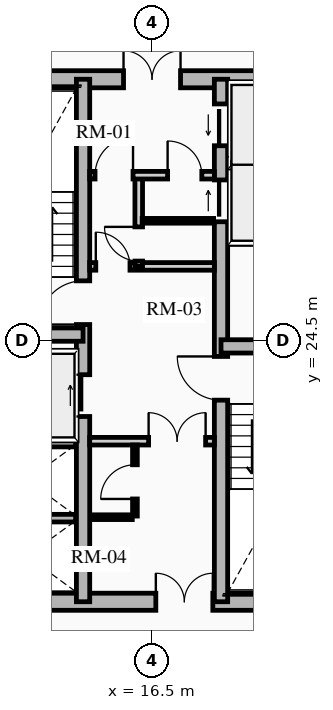
"""IFC4 building model, lengths in metres.
Left out: names, types, materials, properties, quantities, classifications, styles, units other than length and angle.
Written with IfcOpenShell. Run it as: python <this file> out.ifc"""

import sys

from ifc_helpers import new_model, si_unit, direction, frame, frame_2d, origin, place, context, subcontext, project, spatial, rectangle, extrude, source, transform, mapped, element, fill, save


model = new_model("IFC4")
c1 = context("Model", 3, precision=1e-05, world=origin(), true_north=direction((0.0, 1.0)))
c2 = subcontext(c1, "Body", "Model", "MODEL_VIEW")
j1 = project(units=[si_unit("LENGTHUNIT", "METRE"), si_unit("PLANEANGLEUNIT", "RADIAN")], contexts=[c1])
p1 = place(None, origin())
s1 = spatial("IfcSite", under=j1, at=p1, CompositionType="ELEMENT")
p2 = place(p1, origin())
s2 = spatial("IfcBuilding", under=s1, at=p2, CompositionType="ELEMENT")
p3 = place(p2, frame((0.0, 0.0, 93.43)))
s3 = spatial("IfcBuildingStorey", under=s2, at=p3, CompositionType="ELEMENT", Elevation=93.43)
p4 = place(p3, frame((11.15, 17.625, 0.0), z_axis=(0.0, 0.0, 1.0), x_axis=(1.0, 0.0, 0.0)))
e1 = element("IfcWall", 1, at=p4, inside=s3, PredefinedType="SHEAR", context=c2, shape_type="SweptSolid", body=[
    extrude(rectangle(XDim=10.7, YDim=0.45, at=frame_2d((5.35, 0.0))), origin(), (0.0, 0.0, 1.0), 2.91),
])
m1 = source(origin(), c2, "Body", "SweptSolid", [
    extrude(rectangle(XDim=1.5, YDim=2.02, at=frame_2d((0.75, 1.01))), frame((0.0, 0.235, 0.0), z_axis=(0.0, -1.0, 0.0), x_axis=(1.0, 0.0, 0.0)), (0.0, 0.0, 1.0), 0.47),
])
p5 = place(p4, frame((5.45, 0.0, 0.0)))
e2 = element("IfcOpeningElement", 2, at=p5, cuts=e1, PredefinedType="OPENING", context=c2, shape_type="MappedRepresentation", body=[
    mapped(m1, transform((0.0, 0.0, 0.0), x_axis=(1.0, 0.0, 0.0), y_axis=(0.0, 1.0, 0.0), z_axis=(0.0, 0.0, 1.0), scale=1.0)),
])
p6 = place(p3, frame((11.15, 31.375, 0.0), z_axis=(0.0, 0.0, 1.0), x_axis=(1.0, 0.0, 0.0)))
e3 = element("IfcWall", 3, at=p6, inside=s3, PredefinedType="SHEAR", context=c2, shape_type="SweptSolid", body=[
    extrude(rectangle(XDim=10.7, YDim=0.45, at=frame_2d((5.35, 0.0))), origin(), (0.0, 0.0, 1.0), 2.91),
])
p7 = place(p6, frame((4.6, 0.0, 0.0)))
e4 = element("IfcOpeningElement", 4, at=p7, cuts=e3, PredefinedType="OPENING", context=c2, shape_type="MappedRepresentation", body=[
    mapped(m1, transform((0.0, 0.0, 0.0), x_axis=(1.0, 0.0, 0.0), y_axis=(0.0, 1.0, 0.0), z_axis=(0.0, 0.0, 1.0), scale=1.0)),
])
p8 = place(p3, frame((14.685, 17.625, 0.0), z_axis=(0.0, 0.0, 1.0), x_axis=(0.0, 1.0, 0.0)))
e5 = element("IfcWall", 5, at=p8, inside=s3, PredefinedType="SHEAR", context=c2, shape_type="SweptSolid", body=[
    extrude(rectangle(XDim=13.75, YDim=0.35, at=frame_2d((6.875, 0.0))), origin(), (0.0, 0.0, 1.0), 2.91),
])
m2 = source(origin(), c2, "Body", "SweptSolid", [
    extrude(rectangle(XDim=1.1, YDim=2.015, at=frame_2d((0.55, 1.007))), frame((0.0, 0.185, 0.0), z_axis=(0.0, -1.0, 0.0), x_axis=(1.0, 0.0, 0.0)), (0.0, 0.0, 1.0), 0.37),
])
p9 = place(p8, frame((4.875, 0.0, 0.0)))
e6 = element("IfcOpeningElement", 6, at=p9, cuts=e5, PredefinedType="OPENING", context=c2, shape_type="MappedRepresentation", body=[
    mapped(m2, transform((0.0, 0.0, 0.0), x_axis=(1.0, 0.0, 0.0), y_axis=(0.0, 1.0, 0.0), z_axis=(0.0, 0.0, 1.0), scale=1.0)),
])
m3 = source(origin(), c2, "Body", "SweptSolid", [
    extrude(rectangle(XDim=1.15, YDim=2.02, at=frame_2d((0.575, 1.01))), frame((0.0, 0.185, 0.0), z_axis=(0.0, -1.0, 0.0), x_axis=(1.0, 0.0, 0.0)), (0.0, 0.0, 1.0), 0.37),
])
p10 = place(p8, frame((7.295, 0.0, 0.0)))
e7 = element("IfcOpeningElement", 7, at=p10, cuts=e5, PredefinedType="OPENING", context=c2, shape_type="MappedRepresentation", body=[
    mapped(m3, transform((0.0, 0.0, 0.0), x_axis=(1.0, 0.0, 0.0), y_axis=(0.0, 1.0, 0.0), z_axis=(0.0, 0.0, 1.0), scale=1.0)),
])
p11 = place(p3, frame((18.315, 17.625, 0.0), z_axis=(0.0, 0.0, 1.0), x_axis=(0.0, 1.0, 0.0)))
e8 = element("IfcWall", 8, at=p11, inside=s3, PredefinedType="SHEAR", context=c2, shape_type="SweptSolid", body=[
    extrude(rectangle(XDim=13.75, YDim=0.35, at=frame_2d((6.875, 0.0))), origin(), (0.0, 0.0, 1.0), 2.91),
])
p12 = place(p11, frame((10.0, 0.0, 0.0)))
e9 = element("IfcOpeningElement", 9, at=p12, cuts=e8, PredefinedType="OPENING", context=c2, shape_type="MappedRepresentation", body=[
    mapped(m2, transform((0.0, 0.0, 0.0), x_axis=(1.0, 0.0, 0.0), y_axis=(0.0, 1.0, 0.0), z_axis=(0.0, 0.0, 1.0), scale=1.0)),
])
p13 = place(p11, frame((12.0, 0.0, 0.0)))
e10 = element("IfcOpeningElement", 10, at=p13, cuts=e8, PredefinedType="OPENING", context=c2, shape_type="MappedRepresentation", body=[
    mapped(m2, transform((0.0, 0.0, 0.0), x_axis=(1.0, 0.0, 0.0), y_axis=(0.0, 1.0, 0.0), z_axis=(0.0, 0.0, 1.0), scale=1.0)),
])
p14 = place(p11, frame((5.305, 0.0, 0.0)))
e11 = element("IfcOpeningElement", 11, at=p14, cuts=e8, PredefinedType="OPENING", context=c2, shape_type="MappedRepresentation", body=[
    mapped(m3, transform((0.0, 0.0, 0.0), x_axis=(1.0, 0.0, 0.0), y_axis=(0.0, 1.0, 0.0), z_axis=(0.0, 0.0, 1.0), scale=1.0)),
])
for number, where, z_axis, x_axis in (
    (12, (11.4, 24.655, 0.0), (0.0, 0.0, 1.0), (1.0, 0.0, 0.0)),
    (13, (18.315, 24.345, 0.0), (0.0, 0.0, 1.0), (1.0, 0.0, 0.0)),
):
    element("IfcWall", number, at=place(p3, frame(where, z_axis=z_axis, x_axis=x_axis)), inside=s3, PredefinedType="SHEAR", context=c2, shape_type="SweptSolid", body=[
        extrude(rectangle(XDim=3.285, YDim=0.35, at=frame_2d((1.643, 0.0))), origin(), (0.0, 0.0, 1.0), 2.91),
    ])
for number, where, z_axis, x_axis in (
    (14, (11.52, 21.8, 0.0), (0.0, 0.0, 1.0), (1.0, 0.0, 0.0)),
    (15, (11.52, 19.825, 0.0), (0.0, 0.0, 1.0), (1.0, 0.0, 0.0)),
    (16, (18.51, 27.13, 0.0), (0.0, 0.0, 1.0), (1.0, 0.0, 0.0)),
    (17, (18.51, 29.175, 0.0), (0.0, 0.0, 1.0), (1.0, 0.0, 0.0)),
):
    element("IfcWall", number, at=place(p3, frame(where, z_axis=z_axis, x_axis=x_axis)), inside=s3, PredefinedType="SHEAR", context=c2, shape_type="SweptSolid", body=[
        extrude(rectangle(XDim=2.97, YDim=0.2, at=frame_2d((1.485, 0.0))), origin(), (0.0, 0.0, 1.0), 2.91),
    ])
p15 = place(p3, frame((14.86, 21.85, 0.0), z_axis=(0.0, 0.0, 1.0), x_axis=(1.0, 0.0, 0.0)))
e18 = element("IfcWall", 18, at=p15, inside=s3, PredefinedType="PARTITIONING", context=c2, shape_type="SweptSolid", body=[
    extrude(rectangle(XDim=3.28, YDim=0.2, at=frame_2d((1.64, 0.0))), origin(), (0.0, 0.0, 1.0), 2.655),
])
m4 = source(origin(), c2, "Body", "SweptSolid", [
    extrude(rectangle(XDim=1.5, YDim=2.02, at=frame_2d((0.75, 1.01))), frame((0.0, 0.11, 0.0), z_axis=(0.0, -1.0, 0.0), x_axis=(1.0, 0.0, 0.0)), (0.0, 0.0, 1.0), 0.22),
])
p16 = place(p15, frame((1.55, 0.0, 0.0)))
e19 = element("IfcOpeningElement", 19, at=p16, cuts=e18, PredefinedType="OPENING", context=c2, shape_type="MappedRepresentation", body=[
    mapped(m4, transform((0.0, 0.0, 0.0), x_axis=(1.0, 0.0, 0.0), y_axis=(0.0, 1.0, 0.0), z_axis=(0.0, 0.0, 1.0), scale=1.0)),
])
p17 = place(p3, frame((14.86, 26.45, 0.0), z_axis=(0.0, 0.0, 1.0), x_axis=(1.0, 0.0, 0.0)))
e20 = element("IfcWall", 20, at=p17, inside=s3, PredefinedType="PARTITIONING", context=c2, shape_type="SweptSolid", body=[
    extrude(rectangle(XDim=3.28, YDim=0.2, at=frame_2d((1.64, 0.0))), origin(), (0.0, 0.0, 1.0), 2.655),
])
m5 = source(origin(), c2, "Body", "SweptSolid", [
    extrude(rectangle(XDim=0.9, YDim=2.005, at=frame_2d((0.45, 1.002))), frame((0.0, 0.11, 0.0), z_axis=(0.0, -1.0, 0.0), x_axis=(1.0, 0.0, 0.0)), (0.0, 0.0, 1.0), 0.22),
])
p18 = place(p17, frame((0.16, 0.0, 0.0)))
e21 = element("IfcOpeningElement", 21, at=p18, cuts=e20, PredefinedType="OPENING", context=c2, shape_type="MappedRepresentation", body=[
    mapped(m5, transform((0.0, 0.0, 0.0), x_axis=(1.0, 0.0, 0.0), y_axis=(0.0, 1.0, 0.0), z_axis=(0.0, 0.0, 1.0), scale=1.0)),
])
p19 = place(p3, frame((16.15, 26.45, 0.0), z_axis=(0.0, 0.0, 1.0), x_axis=(0.0, 1.0, 0.0)))
e22 = element("IfcWall", 22, at=p19, inside=s3, PredefinedType="PARTITIONING", context=c2, shape_type="SweptSolid", body=[
    extrude(rectangle(XDim=2.4, YDim=0.2, at=frame_2d((1.2, 0.0))), origin(), (0.0, 0.0, 1.0), 2.655),
])
p20 = place(p19, frame((0.14, 0.0, 0.0)))
e23 = element("IfcOpeningElement", 23, at=p20, cuts=e22, PredefinedType="OPENING", context=c2, shape_type="MappedRepresentation", body=[
    mapped(m5, transform((0.0, 0.0, 0.0), x_axis=(1.0, 0.0, 0.0), y_axis=(0.0, 1.0, 0.0), z_axis=(0.0, 0.0, 1.0), scale=1.0)),
])
p21 = place(p3, frame((14.86, 28.85, 0.0), z_axis=(0.0, 0.0, 1.0), x_axis=(1.0, 0.0, 0.0)))
e24 = element("IfcWall", 24, at=p21, inside=s3, PredefinedType="PARTITIONING", context=c2, shape_type="SweptSolid", body=[
    extrude(rectangle(XDim=3.28, YDim=0.2, at=frame_2d((1.64, 0.0))), origin(), (0.0, 0.0, 1.0), 2.655),
])
m6 = source(origin(), c2, "Body", "SweptSolid", [
    extrude(rectangle(XDim=1.0, YDim=2.015, at=frame_2d((0.5, 1.007))), frame((0.0, 0.11, 0.0), z_axis=(0.0, -1.0, 0.0), x_axis=(1.0, 0.0, 0.0)), (0.0, 0.0, 1.0), 0.22),
])
p22 = place(p21, frame((0.14, 0.0, 0.0)))
e25 = element("IfcOpeningElement", 25, at=p22, cuts=e24, PredefinedType="OPENING", context=c2, shape_type="MappedRepresentation", body=[
    mapped(m6, transform((0.0, 0.0, 0.0), x_axis=(1.0, 0.0, 0.0), y_axis=(0.0, 1.0, 0.0), z_axis=(0.0, 0.0, 1.0), scale=1.0)),
])
p23 = place(p21, frame((2.05, 0.0, 0.0)))
e26 = element("IfcOpeningElement", 26, at=p23, cuts=e24, PredefinedType="OPENING", context=c2, shape_type="MappedRepresentation", body=[
    mapped(m5, transform((0.0, 0.0, 0.0), x_axis=(1.0, 0.0, 0.0), y_axis=(0.0, 1.0, 0.0), z_axis=(0.0, 0.0, 1.0), scale=1.0)),
])
p24 = place(p3, frame((16.05, 19.88, 0.0), z_axis=(0.0, 0.0, 1.0), x_axis=(0.0, 1.0, 0.0)))
e27 = element("IfcWall", 27, at=p24, inside=s3, PredefinedType="PARTITIONING", context=c2, shape_type="SweptSolid", body=[
    extrude(rectangle(XDim=1.87, YDim=0.125, at=frame_2d((0.935, 0.0))), origin(), (0.0, 0.0, 1.0), 2.655),
])
m7 = source(origin(), c2, "Body", "SweptSolid", [
    extrude(rectangle(XDim=0.9, YDim=2.005, at=frame_2d((0.45, 1.002))), frame((0.0, 0.073, 0.0), z_axis=(0.0, -1.0, 0.0), x_axis=(1.0, 0.0, 0.0)), (0.0, 0.0, 1.0), 0.145),
])
p25 = place(p24, frame((0.45, 0.0, 0.0)))
e28 = element("IfcOpeningElement", 28, at=p25, cuts=e27, PredefinedType="OPENING", context=c2, shape_type="MappedRepresentation", body=[
    mapped(m7, transform((0.0, 0.0, 0.0), x_axis=(1.0, 0.0, 0.0), y_axis=(0.0, 1.0, 0.0), z_axis=(0.0, 0.0, 1.0), scale=1.0)),
])
p26 = place(p3, frame((14.88, 19.85, 0.0), z_axis=(0.0, 0.0, 1.0), x_axis=(1.0, 0.0, 0.0)))
e29 = element("IfcWall", 29, at=p26, inside=s3, PredefinedType="PARTITIONING", context=c2, shape_type="SweptSolid", body=[
    extrude(rectangle(XDim=1.1, YDim=0.125, at=frame_2d((0.55, 0.0))), origin(), (0.0, 0.0, 1.0), 2.655),
])
p27 = place(p3, frame((16.24, 27.65, 0.0), z_axis=(0.0, 0.0, 1.0), x_axis=(1.0, 0.0, 0.0)))
e30 = element("IfcWall", 30, at=p27, inside=s3, PredefinedType="PARTITIONING", context=c2, shape_type="SweptSolid", body=[
    extrude(rectangle(XDim=1.88, YDim=0.125, at=frame_2d((0.94, 0.0))), origin(), (0.0, 0.0, 1.0), 2.655),
])
m8 = source(origin(), c2, "Body", "SweptSolid", [
    extrude(rectangle(XDim=1.1, YDim=2.015, at=frame_2d((0.55, 1.007))), frame((0.0, 0.025, 0.0), z_axis=(0.0, -1.0, 0.0), x_axis=(1.0, 0.0, 0.0)), (0.0, 0.0, 1.0), 0.05),
])
p28 = place(p9, origin())
e31 = element("IfcDoor", 31, at=p28, inside=s3, OperationType="SLIDING_TO_RIGHT", PredefinedType="DOOR", context=c2, shape_type="MappedRepresentation", body=[
    mapped(m8, transform((0.0, 0.0, 0.0), x_axis=(1.0, 0.0, 0.0), y_axis=(0.0, 1.0, 0.0), z_axis=(0.0, 0.0, 1.0), scale=1.0)),
])
fill(e6, e31)
p29 = place(p12, origin())
e32 = element("IfcDoor", 32, at=p29, inside=s3, OperationType="SLIDING_TO_RIGHT", PredefinedType="DOOR", context=c2, shape_type="MappedRepresentation", body=[
    mapped(m8, transform((0.0, 0.0, 0.0), x_axis=(1.0, 0.0, 0.0), y_axis=(0.0, 1.0, 0.0), z_axis=(0.0, 0.0, 1.0), scale=1.0)),
])
fill(e9, e32)
p30 = place(p13, origin())
e33 = element("IfcDoor", 33, at=p30, inside=s3, OperationType="SLIDING_TO_LEFT", PredefinedType="DOOR", context=c2, shape_type="MappedRepresentation", body=[
    mapped(m8, transform((0.0, 0.0, 0.0), x_axis=(1.0, 0.0, 0.0), y_axis=(0.0, 1.0, 0.0), z_axis=(0.0, 0.0, 1.0), scale=1.0)),
])
fill(e10, e33)
m9 = source(origin(), c2, "Body", "SweptSolid", [
    extrude(rectangle(XDim=1.15, YDim=2.02, at=frame_2d((0.575, 1.01))), frame((0.0, 0.025, 0.0), z_axis=(0.0, -1.0, 0.0), x_axis=(1.0, 0.0, 0.0)), (0.0, 0.0, 1.0), 0.05),
])
p31 = place(p10, origin())
e34 = element("IfcDoor", 34, at=p31, inside=s3, OperationType="SINGLE_SWING_LEFT", PredefinedType="DOOR", context=c2, shape_type="MappedRepresentation", body=[
    mapped(m9, transform((0.0, 0.0, 0.0), x_axis=(1.0, 0.0, 0.0), y_axis=(0.0, 1.0, 0.0), z_axis=(0.0, 0.0, 1.0), scale=1.0)),
])
fill(e7, e34)
p32 = place(p14, origin())
e35 = element("IfcDoor", 35, at=p32, inside=s3, OperationType="SINGLE_SWING_RIGHT", PredefinedType="DOOR", context=c2, shape_type="MappedRepresentation", body=[
    mapped(m9, transform((0.0, 0.0, 0.0), x_axis=(1.0, 0.0, 0.0), y_axis=(0.0, 1.0, 0.0), z_axis=(0.0, 0.0, 1.0), scale=1.0)),
])
fill(e11, e35)
m10 = source(origin(), c2, "Body", "SweptSolid", [
    extrude(rectangle(XDim=1.5, YDim=2.02, at=frame_2d((0.75, 1.01))), frame((0.0, 0.025, 0.0), z_axis=(0.0, -1.0, 0.0), x_axis=(1.0, 0.0, 0.0)), (0.0, 0.0, 1.0), 0.05),
])
p33 = place(p7, origin())
e36 = element("IfcDoor", 36, at=p33, inside=s3, OperationType="DOUBLE_DOOR_SINGLE_SWING", PredefinedType="DOOR", context=c2, shape_type="MappedRepresentation", body=[
    mapped(m10, transform((0.0, 0.0, 0.0), x_axis=(1.0, 0.0, 0.0), y_axis=(0.0, 1.0, 0.0), z_axis=(0.0, 0.0, 1.0), scale=1.0)),
])
fill(e4, e36)
p34 = place(p5, origin())
e37 = element("IfcDoor", 37, at=p34, inside=s3, OperationType="DOUBLE_DOOR_SINGLE_SWING", PredefinedType="DOOR", context=c2, shape_type="MappedRepresentation", body=[
    mapped(m10, transform((0.0, 0.0, 0.0), x_axis=(1.0, 0.0, 0.0), y_axis=(0.0, 1.0, 0.0), z_axis=(0.0, 0.0, 1.0), scale=1.0)),
])
fill(e2, e37)
p35 = place(p16, origin())
e38 = element("IfcDoor", 38, at=p35, inside=s3, OperationType="DOUBLE_DOOR_SINGLE_SWING", PredefinedType="DOOR", context=c2, shape_type="MappedRepresentation", body=[
    mapped(m10, transform((0.0, 0.0, 0.0), x_axis=(1.0, 0.0, 0.0), y_axis=(0.0, 1.0, 0.0), z_axis=(0.0, 0.0, 1.0), scale=1.0)),
])
fill(e19, e38)
m11 = source(origin(), c2, "Body", "SweptSolid", [
    extrude(rectangle(XDim=0.9, YDim=2.005, at=frame_2d((0.45, 1.002))), frame((0.0, 0.025, 0.0), z_axis=(0.0, -1.0, 0.0), x_axis=(1.0, 0.0, 0.0)), (0.0, 0.0, 1.0), 0.05),
])
p36 = place(p18, origin())
e39 = element("IfcDoor", 39, at=p36, inside=s3, OperationType="SINGLE_SWING_LEFT", PredefinedType="DOOR", context=c2, shape_type="MappedRepresentation", body=[
    mapped(m11, transform((0.0, 0.0, 0.0), x_axis=(1.0, 0.0, 0.0), y_axis=(0.0, 1.0, 0.0), z_axis=(0.0, 0.0, 1.0), scale=1.0)),
])
fill(e21, e39)
m12 = source(origin(), c2, "Body", "SweptSolid", [
    extrude(rectangle(XDim=1.0, YDim=2.015, at=frame_2d((0.5, 1.007))), frame((0.0, 0.025, 0.0), z_axis=(0.0, -1.0, 0.0), x_axis=(1.0, 0.0, 0.0)), (0.0, 0.0, 1.0), 0.05),
])
p37 = place(p22, origin())
e40 = element("IfcDoor", 40, at=p37, inside=s3, OperationType="SINGLE_SWING_RIGHT", PredefinedType="DOOR", context=c2, shape_type="MappedRepresentation", body=[
    mapped(m12, transform((0.0, 0.0, 0.0), x_axis=(1.0, 0.0, 0.0), y_axis=(0.0, 1.0, 0.0), z_axis=(0.0, 0.0, 1.0), scale=1.0)),
])
fill(e25, e40)
p38 = place(p25, origin())
e41 = element("IfcDoor", 41, at=p38, inside=s3, OperationType="SINGLE_SWING_LEFT", PredefinedType="DOOR", context=c2, shape_type="MappedRepresentation", body=[
    mapped(m11, transform((0.0, 0.0, 0.0), x_axis=(1.0, 0.0, 0.0), y_axis=(0.0, 1.0, 0.0), z_axis=(0.0, 0.0, 1.0), scale=1.0)),
])
fill(e28, e41)
p39 = place(p20, origin())
e42 = element("IfcDoor", 42, at=p39, inside=s3, OperationType="SINGLE_SWING_RIGHT", PredefinedType="DOOR", context=c2, shape_type="MappedRepresentation", body=[
    mapped(m11, transform((0.0, 0.0, 0.0), x_axis=(1.0, 0.0, 0.0), y_axis=(0.0, 1.0, 0.0), z_axis=(0.0, 0.0, 1.0), scale=1.0)),
])
fill(e23, e42)
p40 = place(p23, origin())
e43 = element("IfcDoor", 43, at=p40, inside=s3, OperationType="SINGLE_SWING_LEFT", PredefinedType="DOOR", context=c2, shape_type="MappedRepresentation", body=[
    mapped(m11, transform((0.0, 0.0, 0.0), x_axis=(1.0, 0.0, 0.0), y_axis=(0.0, 1.0, 0.0), z_axis=(0.0, 0.0, 1.0), scale=1.0)),
])
fill(e26, e43)
save(model, sys.argv[1])
